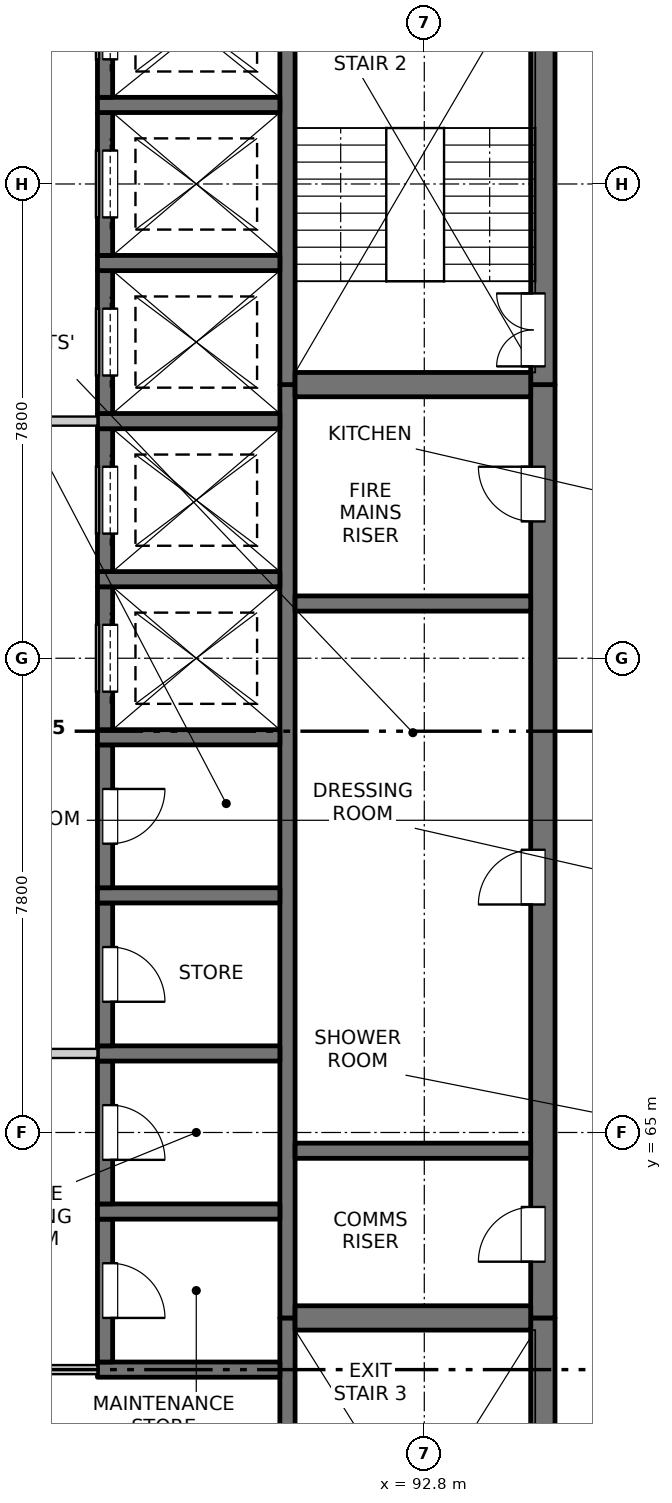
"""IFC4 building model, lengths in metres.
Left out: names, types, materials, properties, quantities, classifications, styles, units other than length and angle.
Written with IfcOpenShell. Run it as: python <this file> out.ifc"""

import sys

from ifc_helpers import new_model, si_unit, direction, frame, frame_2d, origin, place, context, subcontext, project, spatial, rectangle, extrude, element, fill, save


model = new_model("IFC4")
c1 = context("Model", 3, precision=1e-05, world=origin(), true_north=direction((0.0, 1.0)))
c2 = subcontext(c1, "Body", "Model", "MODEL_VIEW")
j1 = project(units=[si_unit("LENGTHUNIT", "METRE"), si_unit("PLANEANGLEUNIT", "RADIAN")], contexts=[c1])
p1 = place(None, origin())
s1 = spatial("IfcSite", under=j1, at=p1, CompositionType="ELEMENT")
p2 = place(p1, origin())
s2 = spatial("IfcBuilding", under=s1, at=p2, CompositionType="ELEMENT")
p3 = place(p2, frame((0.0, 0.0, 224.5)))
s3 = spatial("IfcBuildingStorey", under=s2, at=p3, CompositionType="ELEMENT", Elevation=224.5)
p4 = place(p3, frame((94.75, 55.05, -0.25), z_axis=(0.0, 0.0, 1.0), x_axis=(0.0, 1.0, 0.0)))
e1 = element("IfcWall", 1, at=p4, inside=s3, PredefinedType="SOLIDWALL", context=c2, shape_type="SweptSolid", body=[
    extrude(rectangle(XDim=6.9, YDim=0.4, at=frame_2d((3.45, 0.0))), origin(), (0.0, 0.0, 1.0), 3.4),
])
p5 = place(p4, frame((0.6, 0.0, 0.25)))
e2 = element("IfcOpeningElement", 2, at=p5, cuts=e1, PredefinedType="OPENING", context=c2, shape_type="SweptSolid", body=[
    extrude(rectangle(XDim=1.2, YDim=2.1, at=frame_2d((0.6, 1.05))), frame((0.0, 0.21, 0.0), z_axis=(0.0, -1.0, 0.0), x_axis=(1.0, 0.0, 0.0)), (0.0, 0.0, 1.0), 0.42),
])
p6 = place(p3, frame((94.75, 61.95, -0.25), z_axis=(0.0, 0.0, 1.0), x_axis=(0.0, 1.0, 0.0)))
e3 = element("IfcWall", 3, at=p6, inside=s3, PredefinedType="SOLIDWALL", context=c2, shape_type="SweptSolid", body=[
    extrude(rectangle(XDim=15.35, YDim=0.4, at=frame_2d((7.675, 0.0))), origin(), (0.0, 0.0, 1.0), 3.4),
])
p7 = place(p6, frame((0.925, 0.0, 0.25)))
e4 = element("IfcOpeningElement", 4, at=p7, cuts=e3, PredefinedType="OPENING", context=c2, shape_type="SweptSolid", body=[
    extrude(rectangle(XDim=0.9, YDim=2.1, at=frame_2d((0.45, 1.05))), frame((0.0, 0.21, 0.0), z_axis=(0.0, -1.0, 0.0), x_axis=(1.0, 0.0, 0.0)), (0.0, 0.0, 1.0), 0.42),
])
p8 = place(p6, frame((6.8, 0.0, 0.25)))
e5 = element("IfcOpeningElement", 5, at=p8, cuts=e3, PredefinedType="OPENING", context=c2, shape_type="SweptSolid", body=[
    extrude(rectangle(XDim=0.9, YDim=2.1, at=frame_2d((0.45, 1.05))), frame((0.0, 0.21, 0.0), z_axis=(0.0, -1.0, 0.0), x_axis=(1.0, 0.0, 0.0)), (0.0, 0.0, 1.0), 0.42),
])
p9 = place(p6, frame((13.1, 0.0, 0.25)))
e6 = element("IfcOpeningElement", 6, at=p9, cuts=e3, PredefinedType="OPENING", context=c2, shape_type="SweptSolid", body=[
    extrude(rectangle(XDim=0.9, YDim=2.1, at=frame_2d((0.45, 1.05))), frame((0.0, 0.21, 0.0), z_axis=(0.0, -1.0, 0.0), x_axis=(1.0, 0.0, 0.0)), (0.0, 0.0, 1.0), 0.42),
])
p10 = place(p3, frame((94.75, 77.3, -0.25), z_axis=(0.0, 0.0, 1.0), x_axis=(0.0, 1.0, 0.0)))
e7 = element("IfcWall", 7, at=p10, inside=s3, PredefinedType="SOLIDWALL", context=c2, shape_type="SweptSolid", body=[
    extrude(rectangle(XDim=7.4, YDim=0.4, at=frame_2d((3.7, 0.0))), origin(), (0.0, 0.0, 1.0), 3.4),
])
p11 = place(p10, frame((0.3, 0.0, 0.25)))
e8 = element("IfcOpeningElement", 8, at=p11, cuts=e7, PredefinedType="OPENING", context=c2, shape_type="SweptSolid", body=[
    extrude(rectangle(XDim=1.2, YDim=2.1, at=frame_2d((0.6, 1.05))), frame((0.0, 0.21, 0.0), z_axis=(0.0, -1.0, 0.0), x_axis=(1.0, 0.0, 0.0)), (0.0, 0.0, 1.0), 0.42),
])
p12 = place(p3, frame((90.55, 55.45, -0.25), z_axis=(0.0, 0.0, 1.0), x_axis=(0.0, 1.0, 0.0)))
e9 = element("IfcWall", 9, at=p12, inside=s3, PredefinedType="SOLIDWALL", context=c2, shape_type="SweptSolid", body=[
    extrude(rectangle(XDim=6.5, YDim=0.25, at=frame_2d((3.25, 0.0))), origin(), (0.0, 0.0, 1.0), 3.4),
])
p13 = place(p3, frame((90.55, 61.95, -0.25), z_axis=(0.0, 0.0, 1.0), x_axis=(0.0, 1.0, 0.0)))
e10 = element("IfcWall", 10, at=p13, inside=s3, PredefinedType="SOLIDWALL", context=c2, shape_type="SweptSolid", body=[
    extrude(rectangle(XDim=15.35, YDim=0.25, at=frame_2d((7.675, 0.0))), origin(), (0.0, 0.0, 1.0), 3.4),
])
p14 = place(p3, frame((90.55, 77.3, -0.25), z_axis=(0.0, 0.0, 1.0), x_axis=(0.0, 1.0, 0.0)))
e11 = element("IfcWall", 11, at=p14, inside=s3, PredefinedType="SOLIDWALL", context=c2, shape_type="SweptSolid", body=[
    extrude(rectangle(XDim=7.0, YDim=0.25, at=frame_2d((3.5, 0.0))), origin(), (0.0, 0.0, 1.0), 3.4),
])
p15 = place(p3, frame((87.425, 61.1, -0.25), z_axis=(0.0, 0.0, 1.0), x_axis=(1.0, 0.0, 0.0)))
e12 = element("IfcWall", 12, at=p15, inside=s3, PredefinedType="SOLIDWALL", context=c2, shape_type="SweptSolid", body=[
    extrude(rectangle(XDim=3.0, YDim=0.25, at=frame_2d((1.5, 0.0))), origin(), (0.0, 0.0, 1.0), 3.4),
])
p16 = place(p3, frame((87.55, 61.225, -0.25), z_axis=(0.0, 0.0, 1.0), x_axis=(0.0, 1.0, 0.0)))
e13 = element("IfcWall", 13, at=p16, inside=s3, PredefinedType="SOLIDWALL", context=c2, shape_type="SweptSolid", body=[
    extrude(rectangle(XDim=2.35, YDim=0.25, at=frame_2d((1.175, 0.0))), origin(), (0.0, 0.0, 1.0), 3.4),
])
p17 = place(p16, frame((0.725, 0.0, 0.25)))
e14 = element("IfcOpeningElement", 14, at=p17, cuts=e13, PredefinedType="OPENING", context=c2, shape_type="SweptSolid", body=[
    extrude(rectangle(XDim=0.9, YDim=2.1, at=frame_2d((0.45, 1.05))), frame((0.0, 0.135, 0.0), z_axis=(0.0, -1.0, 0.0), x_axis=(1.0, 0.0, 0.0)), (0.0, 0.0, 1.0), 0.27),
])
p18 = place(p3, frame((87.425, 63.7, -0.25), z_axis=(0.0, 0.0, 1.0), x_axis=(1.0, 0.0, 0.0)))
e15 = element("IfcWall", 15, at=p18, inside=s3, PredefinedType="SOLIDWALL", context=c2, shape_type="SweptSolid", body=[
    extrude(rectangle(XDim=3.0, YDim=0.25, at=frame_2d((1.5, 0.0))), origin(), (0.0, 0.0, 1.0), 3.4),
])
p19 = place(p3, frame((87.55, 63.825, -0.25), z_axis=(0.0, 0.0, 1.0), x_axis=(0.0, 1.0, 0.0)))
e16 = element("IfcWall", 16, at=p19, inside=s3, PredefinedType="SOLIDWALL", context=c2, shape_type="SweptSolid", body=[
    extrude(rectangle(XDim=2.35, YDim=0.25, at=frame_2d((1.175, 0.0))), origin(), (0.0, 0.0, 1.0), 3.4),
])
p20 = place(p19, frame((0.725, 0.0, 0.25)))
e17 = element("IfcOpeningElement", 17, at=p20, cuts=e16, PredefinedType="OPENING", context=c2, shape_type="SweptSolid", body=[
    extrude(rectangle(XDim=0.9, YDim=2.1, at=frame_2d((0.45, 1.05))), frame((0.0, 0.135, 0.0), z_axis=(0.0, -1.0, 0.0), x_axis=(1.0, 0.0, 0.0)), (0.0, 0.0, 1.0), 0.27),
])
p21 = place(p3, frame((87.425, 66.3, -0.25), z_axis=(0.0, 0.0, 1.0), x_axis=(1.0, 0.0, 0.0)))
e18 = element("IfcWall", 18, at=p21, inside=s3, PredefinedType="SOLIDWALL", context=c2, shape_type="SweptSolid", body=[
    extrude(rectangle(XDim=3.0, YDim=0.25, at=frame_2d((1.5, 0.0))), origin(), (0.0, 0.0, 1.0), 3.4),
])
p22 = place(p3, frame((87.55, 66.425, -0.25), z_axis=(0.0, 0.0, 1.0), x_axis=(0.0, 1.0, 0.0)))
e19 = element("IfcWall", 19, at=p22, inside=s3, PredefinedType="SOLIDWALL", context=c2, shape_type="SweptSolid", body=[
    extrude(rectangle(XDim=2.35, YDim=0.25, at=frame_2d((1.175, 0.0))), origin(), (0.0, 0.0, 1.0), 3.4),
])
p23 = place(p22, frame((0.725, 0.0, 0.25)))
e20 = element("IfcOpeningElement", 20, at=p23, cuts=e19, PredefinedType="OPENING", context=c2, shape_type="SweptSolid", body=[
    extrude(rectangle(XDim=0.9, YDim=2.1, at=frame_2d((0.45, 1.05))), frame((0.0, 0.135, 0.0), z_axis=(0.0, -1.0, 0.0), x_axis=(1.0, 0.0, 0.0)), (0.0, 0.0, 1.0), 0.27),
])
p24 = place(p3, frame((87.425, 68.9, -0.25), z_axis=(0.0, 0.0, 1.0), x_axis=(1.0, 0.0, 0.0)))
e21 = element("IfcWall", 21, at=p24, inside=s3, PredefinedType="SOLIDWALL", context=c2, shape_type="SweptSolid", body=[
    extrude(rectangle(XDim=3.0, YDim=0.25, at=frame_2d((1.5, 0.0))), origin(), (0.0, 0.0, 1.0), 3.4),
])
p25 = place(p3, frame((87.55, 69.025, -0.25), z_axis=(0.0, 0.0, 1.0), x_axis=(0.0, 1.0, 0.0)))
e22 = element("IfcWall", 22, at=p25, inside=s3, PredefinedType="SOLIDWALL", context=c2, shape_type="SweptSolid", body=[
    extrude(rectangle(XDim=2.35, YDim=0.25, at=frame_2d((1.175, 0.0))), origin(), (0.0, 0.0, 1.0), 3.4),
])
p26 = place(p25, frame((0.725, 0.0, 0.25)))
e23 = element("IfcOpeningElement", 23, at=p26, cuts=e22, PredefinedType="OPENING", context=c2, shape_type="SweptSolid", body=[
    extrude(rectangle(XDim=0.9, YDim=2.1, at=frame_2d((0.45, 1.05))), frame((0.0, 0.135, 0.0), z_axis=(0.0, -1.0, 0.0), x_axis=(1.0, 0.0, 0.0)), (0.0, 0.0, 1.0), 0.27),
])
p27 = place(p3, frame((87.425, 71.5, -0.25), z_axis=(0.0, 0.0, 1.0), x_axis=(1.0, 0.0, 0.0)))
e24 = element("IfcWall", 24, at=p27, inside=s3, PredefinedType="SOLIDWALL", context=c2, shape_type="SweptSolid", body=[
    extrude(rectangle(XDim=3.0, YDim=0.25, at=frame_2d((1.5, 0.0))), origin(), (0.0, 0.0, 1.0), 3.4),
])
p28 = place(p3, frame((87.55, 71.625, -0.25), z_axis=(0.0, 0.0, 1.0), x_axis=(0.0, 1.0, 0.0)))
e25 = element("IfcWall", 25, at=p28, inside=s3, PredefinedType="SOLIDWALL", context=c2, shape_type="SweptSolid", body=[
    extrude(rectangle(XDim=2.35, YDim=0.25, at=frame_2d((1.175, 0.0))), origin(), (0.0, 0.0, 1.0), 3.4),
])
p29 = place(p28, frame((0.625, 0.0, 0.25)))
e26 = element("IfcOpeningElement", 26, at=p29, cuts=e25, PredefinedType="OPENING", context=c2, shape_type="SweptSolid", body=[
    extrude(rectangle(XDim=1.1, YDim=2.1, at=frame_2d((0.55, 1.05))), frame((0.0, 0.135, 0.0), z_axis=(0.0, -1.0, 0.0), x_axis=(1.0, 0.0, 0.0)), (0.0, 0.0, 1.0), 0.27),
])
p30 = place(p3, frame((87.425, 74.1, -0.25), z_axis=(0.0, 0.0, 1.0), x_axis=(1.0, 0.0, 0.0)))
e27 = element("IfcWall", 27, at=p30, inside=s3, PredefinedType="SOLIDWALL", context=c2, shape_type="SweptSolid", body=[
    extrude(rectangle(XDim=3.0, YDim=0.25, at=frame_2d((1.5, 0.0))), origin(), (0.0, 0.0, 1.0), 3.4),
])
p31 = place(p3, frame((87.55, 74.225, -0.25), z_axis=(0.0, 0.0, 1.0), x_axis=(0.0, 1.0, 0.0)))
e28 = element("IfcWall", 28, at=p31, inside=s3, PredefinedType="SOLIDWALL", context=c2, shape_type="SweptSolid", body=[
    extrude(rectangle(XDim=2.35, YDim=0.25, at=frame_2d((1.175, 0.0))), origin(), (0.0, 0.0, 1.0), 3.4),
])
p32 = place(p31, frame((0.625, 0.0, 0.25)))
e29 = element("IfcOpeningElement", 29, at=p32, cuts=e28, PredefinedType="OPENING", context=c2, shape_type="SweptSolid", body=[
    extrude(rectangle(XDim=1.1, YDim=2.1, at=frame_2d((0.55, 1.05))), frame((0.0, 0.135, 0.0), z_axis=(0.0, -1.0, 0.0), x_axis=(1.0, 0.0, 0.0)), (0.0, 0.0, 1.0), 0.27),
])
p33 = place(p3, frame((87.425, 76.7, -0.25), z_axis=(0.0, 0.0, 1.0), x_axis=(1.0, 0.0, 0.0)))
e30 = element("IfcWall", 30, at=p33, inside=s3, PredefinedType="SOLIDWALL", context=c2, shape_type="SweptSolid", body=[
    extrude(rectangle(XDim=3.0, YDim=0.25, at=frame_2d((1.5, 0.0))), origin(), (0.0, 0.0, 1.0), 3.4),
])
p34 = place(p3, frame((87.55, 76.825, -0.25), z_axis=(0.0, 0.0, 1.0), x_axis=(0.0, 1.0, 0.0)))
e31 = element("IfcWall", 31, at=p34, inside=s3, PredefinedType="SOLIDWALL", context=c2, shape_type="SweptSolid", body=[
    extrude(rectangle(XDim=2.35, YDim=0.25, at=frame_2d((1.175, 0.0))), origin(), (0.0, 0.0, 1.0), 3.4),
])
p35 = place(p34, frame((0.625, 0.0, 0.25)))
e32 = element("IfcOpeningElement", 32, at=p35, cuts=e31, PredefinedType="OPENING", context=c2, shape_type="SweptSolid", body=[
    extrude(rectangle(XDim=1.1, YDim=2.1, at=frame_2d((0.55, 1.05))), frame((0.0, 0.135, 0.0), z_axis=(0.0, -1.0, 0.0), x_axis=(1.0, 0.0, 0.0)), (0.0, 0.0, 1.0), 0.27),
])
p36 = place(p3, frame((87.425, 79.3, -0.25), z_axis=(0.0, 0.0, 1.0), x_axis=(1.0, 0.0, 0.0)))
e33 = element("IfcWall", 33, at=p36, inside=s3, PredefinedType="SOLIDWALL", context=c2, shape_type="SweptSolid", body=[
    extrude(rectangle(XDim=3.0, YDim=0.25, at=frame_2d((1.5, 0.0))), origin(), (0.0, 0.0, 1.0), 3.4),
])
p37 = place(p3, frame((87.55, 79.425, -0.25), z_axis=(0.0, 0.0, 1.0), x_axis=(0.0, 1.0, 0.0)))
e34 = element("IfcWall", 34, at=p37, inside=s3, PredefinedType="SOLIDWALL", context=c2, shape_type="SweptSolid", body=[
    extrude(rectangle(XDim=2.35, YDim=0.25, at=frame_2d((1.175, 0.0))), origin(), (0.0, 0.0, 1.0), 3.4),
])
p38 = place(p37, frame((0.625, 0.0, 0.25)))
e35 = element("IfcOpeningElement", 35, at=p38, cuts=e34, PredefinedType="OPENING", context=c2, shape_type="SweptSolid", body=[
    extrude(rectangle(XDim=1.1, YDim=2.1, at=frame_2d((0.55, 1.05))), frame((0.0, 0.135, 0.0), z_axis=(0.0, -1.0, 0.0), x_axis=(1.0, 0.0, 0.0)), (0.0, 0.0, 1.0), 0.27),
])
p39 = place(p3, frame((87.425, 81.9, -0.25), z_axis=(0.0, 0.0, 1.0), x_axis=(1.0, 0.0, 0.0)))
e36 = element("IfcWall", 36, at=p39, inside=s3, PredefinedType="SOLIDWALL", context=c2, shape_type="SweptSolid", body=[
    extrude(rectangle(XDim=3.0, YDim=0.25, at=frame_2d((1.5, 0.0))), origin(), (0.0, 0.0, 1.0), 3.4),
])
p40 = place(p3, frame((87.55, 82.025, -0.25), z_axis=(0.0, 0.0, 1.0), x_axis=(0.0, 1.0, 0.0)))
e37 = element("IfcWall", 37, at=p40, inside=s3, PredefinedType="SOLIDWALL", context=c2, shape_type="SweptSolid", body=[
    extrude(rectangle(XDim=2.275, YDim=0.25, at=frame_2d((1.138, 0.0))), origin(), (0.0, 0.0, 1.0), 3.4),
])
p41 = place(p40, frame((0.625, 0.0, 0.25)))
e38 = element("IfcOpeningElement", 38, at=p41, cuts=e37, PredefinedType="OPENING", context=c2, shape_type="SweptSolid", body=[
    extrude(rectangle(XDim=1.1, YDim=2.1, at=frame_2d((0.55, 1.05))), frame((0.0, 0.135, 0.0), z_axis=(0.0, -1.0, 0.0), x_axis=(1.0, 0.0, 0.0)), (0.0, 0.0, 1.0), 0.27),
])
p42 = place(p3, frame((90.675, 61.95, -0.25), z_axis=(0.0, 0.0, 1.0), x_axis=(1.0, 0.0, 0.0)))
e39 = element("IfcWall", 39, at=p42, inside=s3, PredefinedType="SOLIDWALL", context=c2, shape_type="SweptSolid", body=[
    extrude(rectangle(XDim=3.875, YDim=0.4, at=frame_2d((1.938, 0.0))), origin(), (0.0, 0.0, 1.0), 3.4),
])
for number, where, z_axis, x_axis in (
    (40, (90.675, 64.7, -0.25), (0.0, 0.0, 1.0), (1.0, 0.0, 0.0)),
    (41, (90.675, 73.7, -0.25), (0.0, 0.0, 1.0), (1.0, 0.0, 0.0)),
):
    element("IfcWall", number, at=place(p3, frame(where, z_axis=z_axis, x_axis=x_axis)), inside=s3, PredefinedType="SOLIDWALL", context=c2, shape_type="SweptSolid", body=[
        extrude(rectangle(XDim=3.875, YDim=0.25, at=frame_2d((1.938, 0.0))), origin(), (0.0, 0.0, 1.0), 3.4),
    ])
p43 = place(p3, frame((90.675, 77.3, -0.25), z_axis=(0.0, 0.0, 1.0), x_axis=(1.0, 0.0, 0.0)))
e42 = element("IfcWall", 42, at=p43, inside=s3, PredefinedType="SOLIDWALL", context=c2, shape_type="SweptSolid", body=[
    extrude(rectangle(XDim=3.875, YDim=0.4, at=frame_2d((1.938, 0.0))), origin(), (0.0, 0.0, 1.0), 3.4),
])
p44 = place(p3, frame((82.575, 61.1, 0.0), z_axis=(0.0, 0.0, 1.0), x_axis=(1.0, 0.0, 0.0)))
e43 = element("IfcWall", 43, at=p44, inside=s3, PredefinedType="PARTITIONING", context=c2, shape_type="SweptSolid", body=[
    extrude(rectangle(XDim=4.85, YDim=0.15, at=frame_2d((2.425, 0.0))), origin(), (0.0, 0.0, 1.0), 3.15),
])
p45 = place(p44, frame((1.525, 0.0, 0.0)))
e44 = element("IfcOpeningElement", 44, at=p45, cuts=e43, PredefinedType="OPENING", context=c2, shape_type="SweptSolid", body=[
    extrude(rectangle(XDim=1.8, YDim=2.1, at=frame_2d((0.9, 1.05))), frame((0.0, 0.085, 0.0), z_axis=(0.0, -1.0, 0.0), x_axis=(1.0, 0.0, 0.0)), (0.0, 0.0, 1.0), 0.17),
])
p46 = place(p3, frame((82.575, 66.3, 0.0), z_axis=(0.0, 0.0, 1.0), x_axis=(1.0, 0.0, 0.0)))
e45 = element("IfcWall", 45, at=p46, inside=s3, PredefinedType="PARTITIONING", context=c2, shape_type="SweptSolid", body=[
    extrude(rectangle(XDim=4.85, YDim=0.15, at=frame_2d((2.425, 0.0))), origin(), (0.0, 0.0, 1.0), 3.15),
])
p47 = place(p46, frame((1.525, 0.0, 0.0)))
e46 = element("IfcOpeningElement", 46, at=p47, cuts=e45, PredefinedType="OPENING", context=c2, shape_type="SweptSolid", body=[
    extrude(rectangle(XDim=1.8, YDim=2.1, at=frame_2d((0.9, 1.05))), frame((0.0, 0.085, 0.0), z_axis=(0.0, -1.0, 0.0), x_axis=(1.0, 0.0, 0.0)), (0.0, 0.0, 1.0), 0.17),
])
p48 = place(p3, frame((82.575, 76.7, 0.0), z_axis=(0.0, 0.0, 1.0), x_axis=(1.0, 0.0, 0.0)))
e47 = element("IfcWall", 47, at=p48, inside=s3, PredefinedType="PARTITIONING", context=c2, shape_type="SweptSolid", body=[
    extrude(rectangle(XDim=4.85, YDim=0.15, at=frame_2d((2.425, 0.0))), origin(), (0.0, 0.0, 1.0), 3.15),
])
p49 = place(p48, frame((1.525, 0.0, 0.0)))
e48 = element("IfcOpeningElement", 48, at=p49, cuts=e47, PredefinedType="OPENING", context=c2, shape_type="SweptSolid", body=[
    extrude(rectangle(XDim=1.8, YDim=2.1, at=frame_2d((0.9, 1.05))), frame((0.0, 0.085, 0.0), z_axis=(0.0, -1.0, 0.0), x_axis=(1.0, 0.0, 0.0)), (0.0, 0.0, 1.0), 0.17),
])
p50 = place(p17, origin())
e49 = element("IfcDoor", 49, at=p50, inside=s3, OperationType="SINGLE_SWING_RIGHT", PredefinedType="DOOR", context=c2, shape_type="SweptSolid", body=[
    extrude(rectangle(XDim=0.9, YDim=2.1, at=frame_2d((0.45, 1.05))), frame((0.0, -0.06, 0.0), z_axis=(0.0, -1.0, 0.0), x_axis=(1.0, 0.0, 0.0)), (0.0, 0.0, 1.0), 0.05),
])
fill(e14, e49)
p51 = place(p7, origin())
e50 = element("IfcDoor", 50, at=p51, inside=s3, OperationType="SINGLE_SWING_LEFT", PredefinedType="DOOR", context=c2, shape_type="SweptSolid", body=[
    extrude(rectangle(XDim=0.9, YDim=2.1, at=frame_2d((0.45, 1.05))), frame((0.0, 0.185, 0.0), z_axis=(0.0, -1.0, 0.0), x_axis=(1.0, 0.0, 0.0)), (0.0, 0.0, 1.0), 0.05),
])
fill(e4, e50)
p52 = place(p20, origin())
e51 = element("IfcDoor", 51, at=p52, inside=s3, OperationType="SINGLE_SWING_RIGHT", PredefinedType="DOOR", context=c2, shape_type="SweptSolid", body=[
    extrude(rectangle(XDim=0.9, YDim=2.1, at=frame_2d((0.45, 1.05))), frame((0.0, -0.06, 0.0), z_axis=(0.0, -1.0, 0.0), x_axis=(1.0, 0.0, 0.0)), (0.0, 0.0, 1.0), 0.05),
])
fill(e17, e51)
p53 = place(p23, origin())
e52 = element("IfcDoor", 52, at=p53, inside=s3, OperationType="SINGLE_SWING_RIGHT", PredefinedType="DOOR", context=c2, shape_type="SweptSolid", body=[
    extrude(rectangle(XDim=0.9, YDim=2.1, at=frame_2d((0.45, 1.05))), frame((0.0, -0.06, 0.0), z_axis=(0.0, -1.0, 0.0), x_axis=(1.0, 0.0, 0.0)), (0.0, 0.0, 1.0), 0.05),
])
fill(e20, e52)
p54 = place(p8, origin())
e53 = element("IfcDoor", 53, at=p54, inside=s3, OperationType="SINGLE_SWING_LEFT", PredefinedType="DOOR", context=c2, shape_type="SweptSolid", body=[
    extrude(rectangle(XDim=0.9, YDim=2.1, at=frame_2d((0.45, 1.05))), frame((0.0, 0.185, 0.0), z_axis=(0.0, -1.0, 0.0), x_axis=(1.0, 0.0, 0.0)), (0.0, 0.0, 1.0), 0.05),
])
fill(e5, e53)
p55 = place(p26, origin())
e54 = element("IfcDoor", 54, at=p55, inside=s3, OperationType="SINGLE_SWING_LEFT", PredefinedType="DOOR", context=c2, shape_type="SweptSolid", body=[
    extrude(rectangle(XDim=0.9, YDim=2.1, at=frame_2d((0.45, 1.05))), frame((0.0, -0.06, 0.0), z_axis=(0.0, -1.0, 0.0), x_axis=(1.0, 0.0, 0.0)), (0.0, 0.0, 1.0), 0.05),
])
fill(e23, e54)
p56 = place(p29, origin())
e55 = element("IfcDoor", 55, at=p56, inside=s3, OperationType="SLIDING_TO_LEFT", PredefinedType="DOOR", context=c2, shape_type="SweptSolid", body=[
    extrude(rectangle(XDim=1.1, YDim=2.1, at=frame_2d((0.55, 1.05))), frame((0.0, -0.06, 0.0), z_axis=(0.0, -1.0, 0.0), x_axis=(1.0, 0.0, 0.0)), (0.0, 0.0, 1.0), 0.05),
])
fill(e26, e55)
p57 = place(p32, origin())
e56 = element("IfcDoor", 56, at=p57, inside=s3, OperationType="SLIDING_TO_LEFT", PredefinedType="DOOR", context=c2, shape_type="SweptSolid", body=[
    extrude(rectangle(XDim=1.1, YDim=2.1, at=frame_2d((0.55, 1.05))), frame((0.0, -0.06, 0.0), z_axis=(0.0, -1.0, 0.0), x_axis=(1.0, 0.0, 0.0)), (0.0, 0.0, 1.0), 0.05),
])
fill(e29, e56)
p58 = place(p9, origin())
e57 = element("IfcDoor", 57, at=p58, inside=s3, OperationType="SINGLE_SWING_RIGHT", PredefinedType="DOOR", context=c2, shape_type="SweptSolid", body=[
    extrude(rectangle(XDim=0.9, YDim=2.1, at=frame_2d((0.45, 1.05))), frame((0.0, 0.185, 0.0), z_axis=(0.0, -1.0, 0.0), x_axis=(1.0, 0.0, 0.0)), (0.0, 0.0, 1.0), 0.05),
])
fill(e6, e57)
p59 = place(p35, origin())
e58 = element("IfcDoor", 58, at=p59, inside=s3, OperationType="SLIDING_TO_LEFT", PredefinedType="DOOR", context=c2, shape_type="SweptSolid", body=[
    extrude(rectangle(XDim=1.1, YDim=2.1, at=frame_2d((0.55, 1.05))), frame((0.0, -0.06, 0.0), z_axis=(0.0, -1.0, 0.0), x_axis=(1.0, 0.0, 0.0)), (0.0, 0.0, 1.0), 0.05),
])
fill(e32, e58)
p60 = place(p11, origin())
e59 = element("IfcDoor", 59, at=p60, inside=s3, OperationType="DOUBLE_DOOR_SINGLE_SWING", PredefinedType="DOOR", context=c2, shape_type="SweptSolid", body=[
    extrude(rectangle(XDim=1.2, YDim=2.1, at=frame_2d((0.6, 1.05))), frame((0.0, 0.185, 0.0), z_axis=(0.0, -1.0, 0.0), x_axis=(1.0, 0.0, 0.0)), (0.0, 0.0, 1.0), 0.05),
])
fill(e8, e59)
p61 = place(p38, origin())
e60 = element("IfcDoor", 60, at=p61, inside=s3, OperationType="SLIDING_TO_RIGHT", PredefinedType="DOOR", context=c2, shape_type="SweptSolid", body=[
    extrude(rectangle(XDim=1.1, YDim=2.1, at=frame_2d((0.55, 1.05))), frame((0.0, -0.06, 0.0), z_axis=(0.0, -1.0, 0.0), x_axis=(1.0, 0.0, 0.0)), (0.0, 0.0, 1.0), 0.05),
])
fill(e35, e60)
p62 = place(p41, origin())
e61 = element("IfcDoor", 61, at=p62, inside=s3, OperationType="SLIDING_TO_RIGHT", PredefinedType="DOOR", context=c2, shape_type="SweptSolid", body=[
    extrude(rectangle(XDim=1.1, YDim=2.1, at=frame_2d((0.55, 1.05))), frame((0.0, -0.06, 0.0), z_axis=(0.0, -1.0, 0.0), x_axis=(1.0, 0.0, 0.0)), (0.0, 0.0, 1.0), 0.05),
])
fill(e38, e61)
save(model, sys.argv[1])
